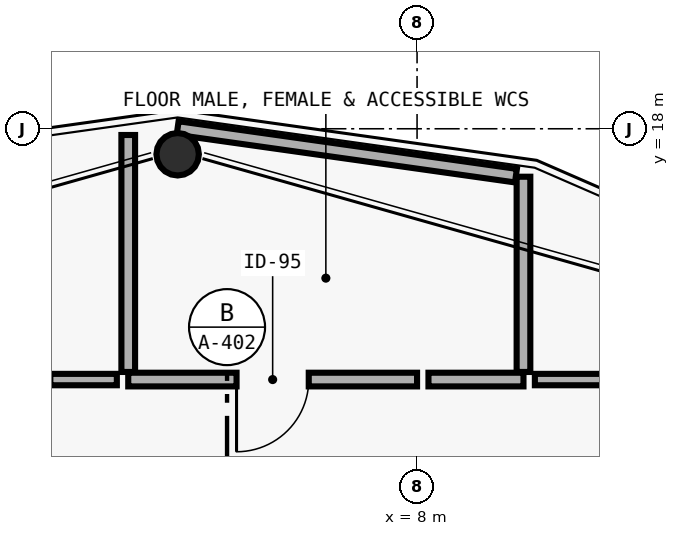
"""IFC4 building model, lengths in metres.
Left out: names, types, materials, properties, quantities, classifications, styles, units other than length and angle.
Written with IfcOpenShell. Run it as: python <this file> out.ifc"""

import sys

from ifc_helpers import new_model, si_unit, direction, frame, frame_2d, origin, origin_2d, place, context, subcontext, project, spatial, rectangle, hollow_circle, extrude, element, fill, save


model = new_model("IFC4")
c1 = context("Model", 3, precision=1e-05, world=origin(), true_north=direction((0.0, 1.0)))
c2 = subcontext(c1, "Body", "Model", "MODEL_VIEW")
j1 = project(units=[si_unit("LENGTHUNIT", "METRE"), si_unit("PLANEANGLEUNIT", "RADIAN")], contexts=[c1])
p1 = place(None, origin())
s1 = spatial("IfcSite", under=j1, at=p1, CompositionType="ELEMENT")
p2 = place(p1, origin())
s2 = spatial("IfcBuilding", under=s1, at=p2, CompositionType="ELEMENT")
p3 = place(p2, frame((0.0, 0.0, 289.5)))
s3 = spatial("IfcBuildingStorey", under=s2, at=p3, CompositionType="ELEMENT", Elevation=289.5)
p4 = place(p3, frame((4.85, 17.7, 0.0), z_axis=(0.0, -0.01587361352, 0.99987400626), x_axis=(1.0, 0.0, 0.0)))
e1 = element("IfcColumn", 1, at=p4, inside=s3, PredefinedType="COLUMN", context=c2, shape_type="SweptSolid", body=[
    extrude(hollow_circle(Radius=0.28, WallThickness=0.02, at=origin_2d()), origin(), (0.0, 0.0, 1.0), 4.476),
])
p5 = place(p3, frame((8.0, 14.7, 0.0), z_axis=(0.0, 0.0, 1.0), x_axis=(-1.0, 0.0, 0.0)))
e2 = element("IfcWall", 2, at=p5, inside=s3, PredefinedType="PLUMBINGWALL", context=c2, shape_type="SweptSolid", body=[
    extrude(rectangle(XDim=3.8, YDim=0.18, at=frame_2d((1.9, 0.0))), origin(), (0.0, 0.0, 1.0), 3.972),
])
p6 = place(p5, frame((1.425, 0.0, 0.0)))
e3 = element("IfcOpeningElement", 3, at=p6, cuts=e2, PredefinedType="OPENING", context=c2, shape_type="SweptSolid", body=[
    extrude(rectangle(XDim=0.95, YDim=2.1, at=frame_2d((0.475, 1.05))), frame((0.0, 0.1, 0.0), z_axis=(0.0, -1.0, 0.0), x_axis=(1.0, 0.0, 0.0)), (0.0, 0.0, 1.0), 0.2),
])
p7 = place(p3, frame((4.05, 14.7, 0.0), z_axis=(0.0, 0.0, 1.0), x_axis=(-1.0, 0.0, 0.0)))
e4 = element("IfcWall", 4, at=p7, inside=s3, PredefinedType="PARTITIONING", context=c2, shape_type="SweptSolid", body=[
    extrude(rectangle(XDim=2.85, YDim=0.15, at=frame_2d((1.425, 0.0))), origin(), (0.0, 0.0, 1.0), 3.972),
])
p8 = place(p7, frame((0.875, 0.0, 0.0)))
e5 = element("IfcOpeningElement", 5, at=p8, cuts=e4, PredefinedType="OPENING", context=c2, shape_type="SweptSolid", body=[
    extrude(rectangle(XDim=0.95, YDim=2.1, at=frame_2d((0.475, 1.05))), frame((0.0, 0.085, 0.0), z_axis=(0.0, -1.0, 0.0), x_axis=(1.0, 0.0, 0.0)), (0.0, 0.0, 1.0), 0.17),
])
p9 = place(p3, frame((9.4, 14.7, 0.0), z_axis=(0.0, 0.0, 1.0), x_axis=(-1.0, 0.0, 0.0)))
e6 = element("IfcWall", 6, at=p9, inside=s3, PredefinedType="PLUMBINGWALL", context=c2, shape_type="SweptSolid", body=[
    extrude(rectangle(XDim=1.25, YDim=0.18, at=frame_2d((0.625, 0.0))), origin(), (0.0, 0.0, 1.0), 3.972),
])
p10 = place(p3, frame((4.2, 17.918, 0.0), z_axis=(0.0, 0.0, 1.0), x_axis=(0.0, -1.0, 0.0)))
e7 = element("IfcWall", 7, at=p10, inside=s3, PredefinedType="PLUMBINGWALL", context=c2, shape_type="SweptSolid", body=[
    extrude(rectangle(XDim=3.118, YDim=0.18, at=frame_2d((1.559, 0.0))), origin(), (0.0, 0.0, 1.0), 4.26),
])
p11 = place(p3, frame((10.715, 14.7, 0.0), z_axis=(0.0, 0.0, 1.0), x_axis=(-1.0, 0.0, 0.0)))
e8 = element("IfcWall", 8, at=p11, inside=s3, PredefinedType="PARTITIONING", context=c2, shape_type="SweptSolid", body=[
    extrude(rectangle(XDim=1.165, YDim=0.15, at=frame_2d((0.583, 0.0))), origin(), (0.0, 0.0, 1.0), 3.972),
])
p12 = place(p3, frame((9.4, 14.8, 0.0), z_axis=(0.0, 0.0, 1.0), x_axis=(0.0, 1.0, 0.0)))
e9 = element("IfcWall", 9, at=p12, inside=s3, PredefinedType="PLUMBINGWALL", context=c2, shape_type="SweptSolid", body=[
    extrude(rectangle(XDim=2.569, YDim=0.18, at=frame_2d((1.284, 0.0))), origin(), (0.0, 0.0, 1.0), 4.26),
])
p13 = place(p3, frame((9.301, 17.383, 0.0), z_axis=(0.0, 0.0, 1.0), x_axis=(-0.990224603287, 0.139482024093, 0.0)))
e10 = element("IfcWall", 10, at=p13, inside=s3, PredefinedType="PLUMBINGWALL", context=c2, shape_type="SweptSolid", body=[
    extrude(rectangle(XDim=4.495, YDim=0.18, at=frame_2d((2.248, 0.0))), origin(), (0.0, 0.0, 1.0), 3.882),
])
p14 = place(p6, origin())
e11 = element("IfcDoor", 11, at=p14, inside=s3, OperationType="SINGLE_SWING_RIGHT", PredefinedType="DOOR", context=c2, shape_type="SweptSolid", body=[
    extrude(rectangle(XDim=0.95, YDim=2.1, at=frame_2d((0.475, 1.05))), frame((0.0, 0.025, 0.0), z_axis=(0.0, -1.0, 0.0), x_axis=(1.0, 0.0, 0.0)), (0.0, 0.0, 1.0), 0.05),
])
fill(e3, e11)
save(model, sys.argv[1])
